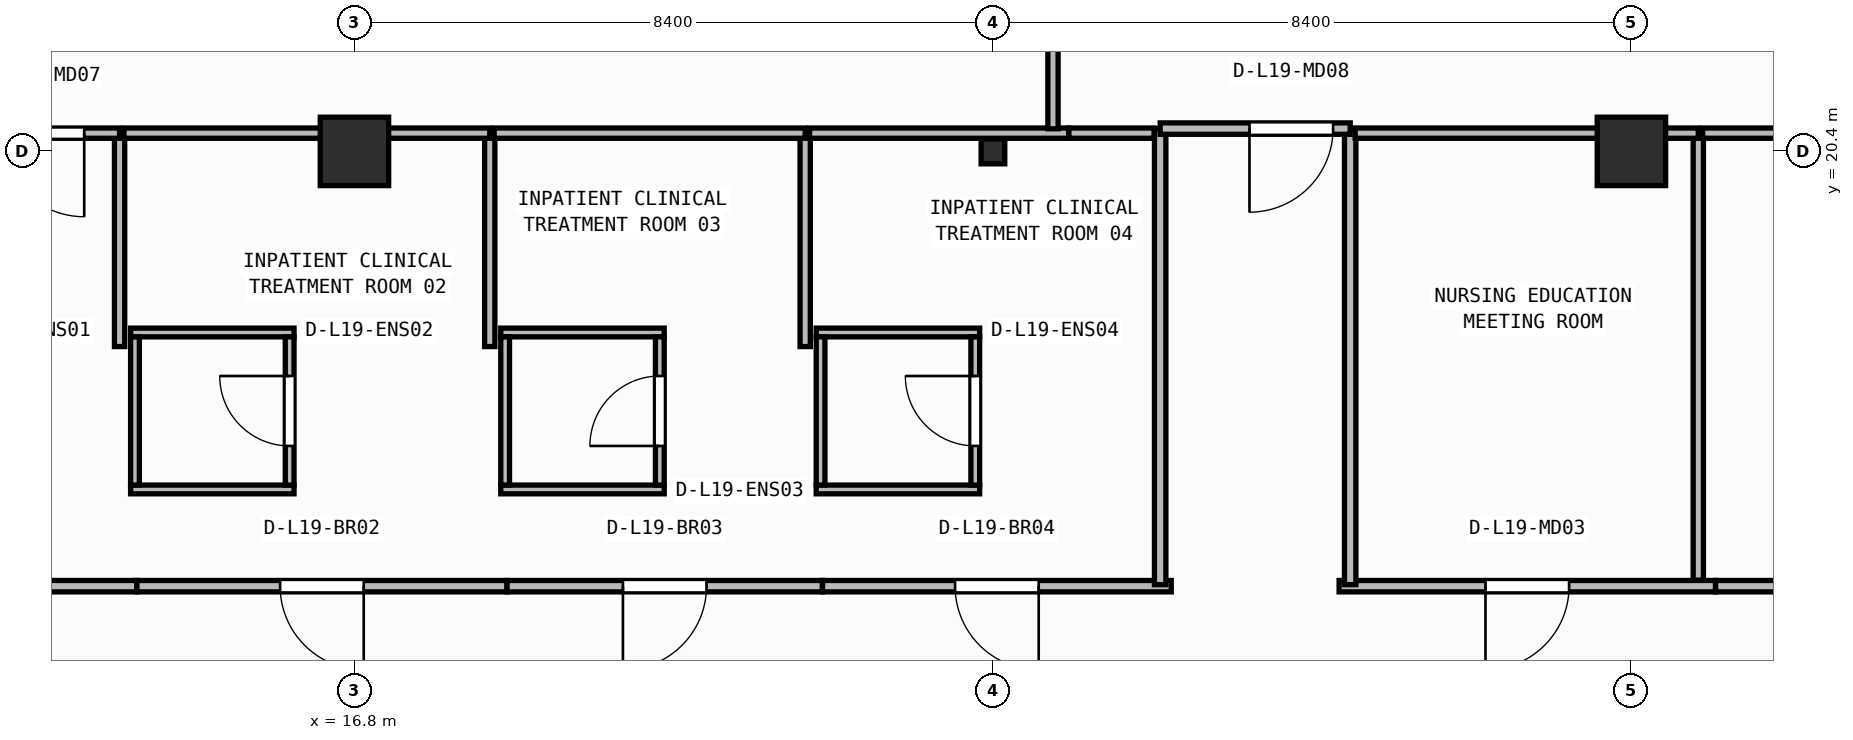
"""IFC4 building model, lengths in metres.
Left out: names, types, materials, properties, quantities, classifications, styles, units other than length and angle.
Written with IfcOpenShell. Run it as: python <this file> out.ifc"""

import sys

from ifc_helpers import new_model, si_unit, direction, frame, frame_2d, origin, origin_2d, place, context, subcontext, project, spatial, rectangle, i_section, extrude, element, fill, save


model = new_model("IFC4")
c1 = context("Model", 3, precision=1e-05, world=origin(), true_north=direction((0.0, 1.0)))
c2 = subcontext(c1, "Body", "Model", "MODEL_VIEW")
j1 = project(units=[si_unit("LENGTHUNIT", "METRE"), si_unit("PLANEANGLEUNIT", "RADIAN")], contexts=[c1])
p1 = place(None, origin())
s1 = spatial("IfcSite", under=j1, at=p1, CompositionType="ELEMENT")
p2 = place(p1, origin())
s2 = spatial("IfcBuilding", under=s1, at=p2, CompositionType="ELEMENT")
p3 = place(p2, frame((0.0, 0.0, 77.8)))
s3 = spatial("IfcBuildingStorey", under=s2, at=p3, CompositionType="ELEMENT", Elevation=77.8)
p4 = place(p3, frame((16.8, 20.4, 0.0), z_axis=(0.0, 0.0, 1.0), x_axis=(1.0, 0.0, 0.0)))
e1 = element("IfcColumn", 1, at=p4, inside=s3, PredefinedType="COLUMN", context=c2, shape_type="SweptSolid", body=[
    extrude(rectangle(XDim=0.9, YDim=0.9, at=origin_2d()), origin(), (0.0, 0.0, 1.0), 3.95),
])
p5 = place(p3, frame((25.2, 20.4, 0.0), z_axis=(0.0, 0.0, 1.0), x_axis=(1.0, 0.0, 0.0)))
e2 = element("IfcColumn", 2, at=p5, inside=s3, PredefinedType="COLUMN", context=c2, shape_type="SweptSolid", body=[
    extrude(i_section(OverallWidth=0.311, OverallDepth=0.327, WebThickness=0.016, FlangeThickness=0.025, FilletRadius=0.017, at=origin_2d()), origin(), (0.0, 0.0, 1.0), 3.95),
])
p6 = place(p3, frame((33.6, 20.4, 0.0), z_axis=(0.0, 0.0, 1.0), x_axis=(1.0, 0.0, 0.0)))
e3 = element("IfcColumn", 3, at=p6, inside=s3, PredefinedType="COLUMN", context=c2, shape_type="SweptSolid", body=[
    extrude(rectangle(XDim=0.9, YDim=0.9, at=origin_2d()), origin(), (0.0, 0.0, 1.0), 3.95),
])
for number, where, z_axis, x_axis in (
    (4, (13.855, 15.952, 0.0), (0.0, 0.0, 1.0), (1.0, 0.0, 0.0)),
    (5, (13.855, 18.018, 0.0), (0.0, 0.0, 1.0), (1.0, 0.0, 0.0)),
):
    element("IfcWall", number, at=place(p3, frame(where, z_axis=z_axis, x_axis=x_axis)), inside=s3, PredefinedType="PARTITIONING", context=c2, shape_type="SweptSolid", body=[
        extrude(rectangle(XDim=2.15, YDim=0.115, at=frame_2d((1.075, 0.0))), origin(), (0.0, 0.0, 1.0), 3.71),
    ])
p7 = place(p3, frame((13.913, 16.01, 0.0), z_axis=(0.0, 0.0, 1.0), x_axis=(0.0, 1.0, 0.0)))
e6 = element("IfcWall", 6, at=p7, inside=s3, PredefinedType="PARTITIONING", context=c2, shape_type="SweptSolid", body=[
    extrude(rectangle(XDim=1.95, YDim=0.115, at=frame_2d((0.975, 0.0))), origin(), (0.0, 0.0, 1.0), 3.71),
])
p8 = place(p3, frame((15.948, 16.01, 0.0), z_axis=(0.0, 0.0, 1.0), x_axis=(0.0, 1.0, 0.0)))
e7 = element("IfcWall", 7, at=p8, inside=s3, PredefinedType="PARTITIONING", context=c2, shape_type="SweptSolid", body=[
    extrude(rectangle(XDim=1.95, YDim=0.115, at=frame_2d((0.975, 0.0))), origin(), (0.0, 0.0, 1.0), 3.71),
])
p9 = place(p8, frame((0.515, 0.0, 0.0)))
e8 = element("IfcOpeningElement", 8, at=p9, cuts=e7, PredefinedType="OPENING", context=c2, shape_type="SweptSolid", body=[
    extrude(rectangle(XDim=0.92, YDim=2.1, at=frame_2d((0.46, 1.05))), frame((0.0, 0.067, 0.0), z_axis=(0.0, -1.0, 0.0), x_axis=(1.0, 0.0, 0.0)), (0.0, 0.0, 1.0), 0.135),
])
for number, where, z_axis, x_axis in (
    (9, (18.725, 15.952, 0.0), (0.0, 0.0, 1.0), (1.0, 0.0, 0.0)),
    (10, (18.725, 18.018, 0.0), (0.0, 0.0, 1.0), (1.0, 0.0, 0.0)),
):
    element("IfcWall", number, at=place(p3, frame(where, z_axis=z_axis, x_axis=x_axis)), inside=s3, PredefinedType="PARTITIONING", context=c2, shape_type="SweptSolid", body=[
        extrude(rectangle(XDim=2.15, YDim=0.115, at=frame_2d((1.075, 0.0))), origin(), (0.0, 0.0, 1.0), 3.71),
    ])
p10 = place(p3, frame((18.782, 16.01, 0.0), z_axis=(0.0, 0.0, 1.0), x_axis=(0.0, 1.0, 0.0)))
e11 = element("IfcWall", 11, at=p10, inside=s3, PredefinedType="PARTITIONING", context=c2, shape_type="SweptSolid", body=[
    extrude(rectangle(XDim=1.95, YDim=0.115, at=frame_2d((0.975, 0.0))), origin(), (0.0, 0.0, 1.0), 3.71),
])
p11 = place(p3, frame((20.817, 16.01, 0.0), z_axis=(0.0, 0.0, 1.0), x_axis=(0.0, 1.0, 0.0)))
e12 = element("IfcWall", 12, at=p11, inside=s3, PredefinedType="PARTITIONING", context=c2, shape_type="SweptSolid", body=[
    extrude(rectangle(XDim=1.95, YDim=0.115, at=frame_2d((0.975, 0.0))), origin(), (0.0, 0.0, 1.0), 3.71),
])
p12 = place(p11, frame((0.515, 0.0, 0.0)))
e13 = element("IfcOpeningElement", 13, at=p12, cuts=e12, PredefinedType="OPENING", context=c2, shape_type="SweptSolid", body=[
    extrude(rectangle(XDim=0.92, YDim=2.1, at=frame_2d((0.46, 1.05))), frame((0.0, 0.067, 0.0), z_axis=(0.0, -1.0, 0.0), x_axis=(1.0, 0.0, 0.0)), (0.0, 0.0, 1.0), 0.135),
])
for number, where, z_axis, x_axis in (
    (14, (22.875, 15.952, 0.0), (0.0, 0.0, 1.0), (1.0, 0.0, 0.0)),
    (15, (22.875, 18.018, 0.0), (0.0, 0.0, 1.0), (1.0, 0.0, 0.0)),
):
    element("IfcWall", number, at=place(p3, frame(where, z_axis=z_axis, x_axis=x_axis)), inside=s3, PredefinedType="PARTITIONING", context=c2, shape_type="SweptSolid", body=[
        extrude(rectangle(XDim=2.15, YDim=0.115, at=frame_2d((1.075, 0.0))), origin(), (0.0, 0.0, 1.0), 3.71),
    ])
p13 = place(p3, frame((22.933, 16.01, 0.0), z_axis=(0.0, 0.0, 1.0), x_axis=(0.0, 1.0, 0.0)))
e16 = element("IfcWall", 16, at=p13, inside=s3, PredefinedType="PARTITIONING", context=c2, shape_type="SweptSolid", body=[
    extrude(rectangle(XDim=1.95, YDim=0.115, at=frame_2d((0.975, 0.0))), origin(), (0.0, 0.0, 1.0), 3.71),
])
p14 = place(p3, frame((24.968, 16.01, 0.0), z_axis=(0.0, 0.0, 1.0), x_axis=(0.0, 1.0, 0.0)))
e17 = element("IfcWall", 17, at=p14, inside=s3, PredefinedType="PARTITIONING", context=c2, shape_type="SweptSolid", body=[
    extrude(rectangle(XDim=1.95, YDim=0.115, at=frame_2d((0.975, 0.0))), origin(), (0.0, 0.0, 1.0), 3.073),
])
p15 = place(p14, frame((0.515, 0.0, 0.0)))
e18 = element("IfcOpeningElement", 18, at=p15, cuts=e17, PredefinedType="OPENING", context=c2, shape_type="SweptSolid", body=[
    extrude(rectangle(XDim=0.92, YDim=2.1, at=frame_2d((0.46, 1.05))), frame((0.0, 0.067, 0.0), z_axis=(0.0, -1.0, 0.0), x_axis=(1.0, 0.0, 0.0)), (0.0, 0.0, 1.0), 0.135),
])
p16 = place(p3, frame((13.936, 14.68, 0.0), z_axis=(0.0, 0.0, 1.0), x_axis=(-1.0, 0.0, 0.0)))
e19 = element("IfcWall", 19, at=p16, inside=s3, PredefinedType="PARTITIONING", context=c2, shape_type="SweptSolid", body=[
    extrude(rectangle(XDim=4.508, YDim=0.15, at=frame_2d((2.254, 0.0))), origin(), (0.0, 0.0, 1.0), 3.71),
])
p17 = place(p16, frame((1.704, 0.0, 0.0)))
e20 = element("IfcOpeningElement", 20, at=p17, cuts=e19, PredefinedType="OPENING", context=c2, shape_type="SweptSolid", body=[
    extrude(rectangle(XDim=1.1, YDim=2.1, at=frame_2d((0.55, 1.05))), frame((0.0, 0.085, 0.0), z_axis=(0.0, -1.0, 0.0), x_axis=(1.0, 0.0, 0.0)), (0.0, 0.0, 1.0), 0.17),
])
p18 = place(p3, frame((18.806, 14.68, 0.0), z_axis=(0.0, 0.0, 1.0), x_axis=(-1.0, 0.0, 0.0)))
e21 = element("IfcWall", 21, at=p18, inside=s3, PredefinedType="PARTITIONING", context=c2, shape_type="SweptSolid", body=[
    extrude(rectangle(XDim=4.868, YDim=0.15, at=frame_2d((2.434, 0.0))), origin(), (0.0, 0.0, 1.0), 3.71),
])
p19 = place(p18, frame((1.884, 0.0, 0.0)))
e22 = element("IfcOpeningElement", 22, at=p19, cuts=e21, PredefinedType="OPENING", context=c2, shape_type="SweptSolid", body=[
    extrude(rectangle(XDim=1.1, YDim=2.1, at=frame_2d((0.55, 1.05))), frame((0.0, 0.085, 0.0), z_axis=(0.0, -1.0, 0.0), x_axis=(1.0, 0.0, 0.0)), (0.0, 0.0, 1.0), 0.17),
])
p20 = place(p3, frame((22.956, 14.68, 0.0), z_axis=(0.0, 0.0, 1.0), x_axis=(-1.0, 0.0, 0.0)))
e23 = element("IfcWall", 23, at=p20, inside=s3, PredefinedType="PARTITIONING", context=c2, shape_type="SweptSolid", body=[
    extrude(rectangle(XDim=4.148, YDim=0.15, at=frame_2d((2.074, 0.0))), origin(), (0.0, 0.0, 1.0), 3.71),
])
p21 = place(p20, frame((1.524, 0.0, 0.0)))
e24 = element("IfcOpeningElement", 24, at=p21, cuts=e23, PredefinedType="OPENING", context=c2, shape_type="SweptSolid", body=[
    extrude(rectangle(XDim=1.1, YDim=2.1, at=frame_2d((0.55, 1.05))), frame((0.0, 0.085, 0.0), z_axis=(0.0, -1.0, 0.0), x_axis=(1.0, 0.0, 0.0)), (0.0, 0.0, 1.0), 0.17),
])
p22 = place(p3, frame((27.546, 14.68, 0.0), z_axis=(0.0, 0.0, 1.0), x_axis=(-1.0, 0.0, 0.0)))
e25 = element("IfcWall", 25, at=p22, inside=s3, PredefinedType="PARTITIONING", context=c2, shape_type="SweptSolid", body=[
    extrude(rectangle(XDim=4.588, YDim=0.15, at=frame_2d((2.294, 0.0))), origin(), (0.0, 0.0, 1.0), 3.71),
])
p23 = place(p22, frame((1.744, 0.0, 0.0)))
e26 = element("IfcOpeningElement", 26, at=p23, cuts=e25, PredefinedType="OPENING", context=c2, shape_type="SweptSolid", body=[
    extrude(rectangle(XDim=1.1, YDim=2.1, at=frame_2d((0.55, 1.05))), frame((0.0, 0.085, 0.0), z_axis=(0.0, -1.0, 0.0), x_axis=(1.0, 0.0, 0.0)), (0.0, 0.0, 1.0), 0.17),
])
p24 = place(p3, frame((34.706, 14.68, 0.0), z_axis=(0.0, 0.0, 1.0), x_axis=(-1.0, 0.0, 0.0)))
e27 = element("IfcWall", 27, at=p24, inside=s3, PredefinedType="PARTITIONING", context=c2, shape_type="SweptSolid", body=[
    extrude(rectangle(XDim=4.952, YDim=0.15, at=frame_2d((2.476, 0.0))), origin(), (0.0, 0.0, 1.0), 3.71),
])
p25 = place(p24, frame((1.926, 0.0, 0.0)))
e28 = element("IfcOpeningElement", 28, at=p25, cuts=e27, PredefinedType="OPENING", context=c2, shape_type="SweptSolid", body=[
    extrude(rectangle(XDim=1.1, YDim=2.1, at=frame_2d((0.55, 1.05))), frame((0.0, 0.085, 0.0), z_axis=(0.0, -1.0, 0.0), x_axis=(1.0, 0.0, 0.0)), (0.0, 0.0, 1.0), 0.17),
])
p26 = place(p3, frame((40.606, 14.68, 0.0), z_axis=(0.0, 0.0, 1.0), x_axis=(-1.0, 0.0, 0.0)))
e29 = element("IfcWall", 29, at=p26, inside=s3, PredefinedType="PARTITIONING", context=c2, shape_type="SweptSolid", body=[
    extrude(rectangle(XDim=5.898, YDim=0.15, at=frame_2d((2.949, 0.0))), origin(), (0.0, 0.0, 1.0), 3.71),
])
p27 = place(p26, frame((2.399, 0.0, 0.0)))
e30 = element("IfcOpeningElement", 30, at=p27, cuts=e29, PredefinedType="OPENING", context=c2, shape_type="SweptSolid", body=[
    extrude(rectangle(XDim=1.1, YDim=2.1, at=frame_2d((0.55, 1.05))), frame((0.0, 0.085, 0.0), z_axis=(0.0, -1.0, 0.0), x_axis=(1.0, 0.0, 0.0)), (0.0, 0.0, 1.0), 0.17),
])
for number, where, z_axis, x_axis in (
    (31, (27.4, 20.7, 0.0), (0.0, 0.0, 1.0), (0.0, -1.0, 0.0)),
    (32, (29.9, 14.7, 0.0), (0.0, 0.0, 1.0), (0.0, 1.0, 0.0)),
):
    element("IfcWall", number, at=place(p3, frame(where, z_axis=z_axis, x_axis=x_axis)), inside=s3, PredefinedType="PARTITIONING", context=c2, shape_type="SweptSolid", body=[
        extrude(rectangle(XDim=6.0, YDim=0.15, at=frame_2d((3.0, 0.0))), origin(), (0.0, 0.0, 1.0), 3.71),
    ])
p28 = place(p3, frame((29.9, 20.7, 0.0), z_axis=(0.0, 0.0, 1.0), x_axis=(-1.0, 0.0, 0.0)))
e33 = element("IfcWall", 33, at=p28, inside=s3, PredefinedType="PARTITIONING", context=c2, shape_type="SweptSolid", body=[
    extrude(rectangle(XDim=2.5, YDim=0.15, at=frame_2d((1.25, 0.0))), origin(), (0.0, 0.0, 1.0), 3.073),
])
p29 = place(p28, frame((0.225, 0.0, 0.0)))
e34 = element("IfcOpeningElement", 34, at=p29, cuts=e33, PredefinedType="OPENING", context=c2, shape_type="SweptSolid", body=[
    extrude(rectangle(XDim=1.1, YDim=2.1, at=frame_2d((0.55, 1.05))), frame((0.0, 0.085, 0.0), z_axis=(0.0, -1.0, 0.0), x_axis=(1.0, 0.0, 0.0)), (0.0, 0.0, 1.0), 0.17),
])
p30 = place(p3, frame((13.71, 17.833, 0.0), z_axis=(0.0, 0.0, 1.0), x_axis=(0.0, 1.0, 0.0)))
e35 = element("IfcWall", 35, at=p30, inside=s3, PredefinedType="PARTITIONING", context=c2, shape_type="SweptSolid", body=[
    extrude(rectangle(XDim=2.807, YDim=0.135, at=frame_2d((1.404, 0.0))), origin(), (0.0, 0.0, 1.0), 3.71),
])
p31 = place(p3, frame((13.71, 20.64, 0.0), z_axis=(0.0, 0.0, 1.0), x_axis=(-1.0, 0.0, 0.0)))
e36 = element("IfcWall", 36, at=p31, inside=s3, PredefinedType="PARTITIONING", context=c2, shape_type="SweptSolid", body=[
    extrude(rectangle(XDim=2.031, YDim=0.135, at=frame_2d((1.015, 0.0))), origin(), (0.0, 0.0, 1.0), 3.073),
])
p32 = place(p31, frame((0.465, 0.0, 0.0)))
e37 = element("IfcOpeningElement", 37, at=p32, cuts=e36, PredefinedType="OPENING", context=c2, shape_type="SweptSolid", body=[
    extrude(rectangle(XDim=1.1, YDim=2.1, at=frame_2d((0.55, 1.05))), frame((0.0, 0.077, 0.0), z_axis=(0.0, -1.0, 0.0), x_axis=(1.0, 0.0, 0.0)), (0.0, 0.0, 1.0), 0.155),
])
p33 = place(p3, frame((18.58, 17.833, 0.0), z_axis=(0.0, 0.0, 1.0), x_axis=(0.0, 1.0, 0.0)))
e38 = element("IfcWall", 38, at=p33, inside=s3, PredefinedType="PARTITIONING", context=c2, shape_type="SweptSolid", body=[
    extrude(rectangle(XDim=2.807, YDim=0.135, at=frame_2d((1.404, 0.0))), origin(), (0.0, 0.0, 1.0), 3.71),
])
p34 = place(p3, frame((18.58, 20.64, 0.0), z_axis=(0.0, 0.0, 1.0), x_axis=(-1.0, 0.0, 0.0)))
e39 = element("IfcWall", 39, at=p34, inside=s3, PredefinedType="PARTITIONING", context=c2, shape_type="SweptSolid", body=[
    extrude(rectangle(XDim=4.812, YDim=0.135, at=frame_2d((2.406, 0.0))), origin(), (0.0, 0.0, 1.0), 3.073),
])
p35 = place(p3, frame((22.73, 17.833, 0.0), z_axis=(0.0, 0.0, 1.0), x_axis=(0.0, 1.0, 0.0)))
e40 = element("IfcWall", 40, at=p35, inside=s3, PredefinedType="PARTITIONING", context=c2, shape_type="SweptSolid", body=[
    extrude(rectangle(XDim=2.807, YDim=0.135, at=frame_2d((1.404, 0.0))), origin(), (0.0, 0.0, 1.0), 3.71),
])
p36 = place(p3, frame((22.73, 20.64, 0.0), z_axis=(0.0, 0.0, 1.0), x_axis=(-1.0, 0.0, 0.0)))
e41 = element("IfcWall", 41, at=p36, inside=s3, PredefinedType="PARTITIONING", context=c2, shape_type="SweptSolid", body=[
    extrude(rectangle(XDim=4.093, YDim=0.135, at=frame_2d((2.046, 0.0))), origin(), (0.0, 0.0, 1.0), 3.073),
])
p37 = place(p3, frame((26.198, 20.64, 0.0), z_axis=(0.0, 0.0, 1.0), x_axis=(-1.0, 0.0, 0.0)))
e42 = element("IfcWall", 42, at=p37, inside=s3, PredefinedType="PARTITIONING", context=c2, shape_type="SweptSolid", body=[
    extrude(rectangle(XDim=3.41, YDim=0.135, at=frame_2d((1.705, 0.0))), origin(), (0.0, 0.0, 1.0), 3.073),
])
p38 = place(p3, frame((27.32, 20.64, 0.0), z_axis=(0.0, 0.0, 1.0), x_axis=(-1.0, 0.0, 0.0)))
e43 = element("IfcWall", 43, at=p38, inside=s3, PredefinedType="PARTITIONING", context=c2, shape_type="SweptSolid", body=[
    extrude(rectangle(XDim=1.121, YDim=0.135, at=frame_2d((0.56, 0.0))), origin(), (0.0, 0.0, 1.0), 3.073),
])
p39 = place(p3, frame((34.48, 14.76, 0.0), z_axis=(0.0, 0.0, 1.0), x_axis=(0.0, 1.0, 0.0)))
e44 = element("IfcWall", 44, at=p39, inside=s3, PredefinedType="PARTITIONING", context=c2, shape_type="SweptSolid", body=[
    extrude(rectangle(XDim=5.88, YDim=0.135, at=frame_2d((2.94, 0.0))), origin(), (0.0, 0.0, 1.0), 3.71),
])
p40 = place(p3, frame((34.48, 20.64, 0.0), z_axis=(0.0, 0.0, 1.0), x_axis=(-1.0, 0.0, 0.0)))
e45 = element("IfcWall", 45, at=p40, inside=s3, PredefinedType="PARTITIONING", context=c2, shape_type="SweptSolid", body=[
    extrude(rectangle(XDim=4.515, YDim=0.135, at=frame_2d((2.257, 0.0))), origin(), (0.0, 0.0, 1.0), 3.073),
])
p41 = place(p3, frame((40.38, 20.64, 0.0), z_axis=(0.0, 0.0, 1.0), x_axis=(-1.0, 0.0, 0.0)))
e46 = element("IfcWall", 46, at=p41, inside=s3, PredefinedType="PARTITIONING", context=c2, shape_type="SweptSolid", body=[
    extrude(rectangle(XDim=5.842, YDim=0.135, at=frame_2d((2.921, 0.0))), origin(), (0.0, 0.0, 1.0), 3.073),
])
p42 = place(p3, frame((25.99, 20.698, 0.0), z_axis=(0.0, 0.0, 1.0), x_axis=(0.0, 1.0, 0.0)))
e47 = element("IfcWall", 47, at=p42, inside=s3, PredefinedType="PARTITIONING", context=c2, shape_type="SweptSolid", body=[
    extrude(rectangle(XDim=10.779, YDim=0.135, at=frame_2d((5.39, 0.0))), origin(), (0.0, 0.0, 1.0), 3.71),
])
p43 = place(p9, origin())
e48 = element("IfcDoor", 48, at=p43, inside=s3, OperationType="SINGLE_SWING_RIGHT", PredefinedType="DOOR", context=c2, shape_type="SweptSolid", body=[
    extrude(rectangle(XDim=0.92, YDim=2.1, at=frame_2d((0.46, 1.05))), frame((0.0, 0.025, 0.0), z_axis=(0.0, -1.0, 0.0), x_axis=(1.0, 0.0, 0.0)), (0.0, 0.0, 1.0), 0.05),
])
fill(e8, e48)
p44 = place(p12, origin())
e49 = element("IfcDoor", 49, at=p44, inside=s3, OperationType="SINGLE_SWING_LEFT", PredefinedType="DOOR", context=c2, shape_type="SweptSolid", body=[
    extrude(rectangle(XDim=0.92, YDim=2.1, at=frame_2d((0.46, 1.05))), frame((0.0, 0.025, 0.0), z_axis=(0.0, -1.0, 0.0), x_axis=(1.0, 0.0, 0.0)), (0.0, 0.0, 1.0), 0.05),
])
fill(e13, e49)
p45 = place(p15, origin())
e50 = element("IfcDoor", 50, at=p45, inside=s3, OperationType="SINGLE_SWING_RIGHT", PredefinedType="DOOR", context=c2, shape_type="SweptSolid", body=[
    extrude(rectangle(XDim=0.92, YDim=2.1, at=frame_2d((0.46, 1.05))), frame((0.0, 0.025, 0.0), z_axis=(0.0, -1.0, 0.0), x_axis=(1.0, 0.0, 0.0)), (0.0, 0.0, 1.0), 0.05),
])
fill(e18, e50)
p46 = place(p19, origin())
e51 = element("IfcDoor", 51, at=p46, inside=s3, OperationType="SINGLE_SWING_LEFT", PredefinedType="DOOR", context=c2, shape_type="SweptSolid", body=[
    extrude(rectangle(XDim=1.1, YDim=2.1, at=frame_2d((0.55, 1.05))), frame((0.0, 0.025, 0.0), z_axis=(0.0, -1.0, 0.0), x_axis=(1.0, 0.0, 0.0)), (0.0, 0.0, 1.0), 0.05),
])
fill(e22, e51)
p47 = place(p21, origin())
e52 = element("IfcDoor", 52, at=p47, inside=s3, OperationType="SINGLE_SWING_RIGHT", PredefinedType="DOOR", context=c2, shape_type="SweptSolid", body=[
    extrude(rectangle(XDim=1.1, YDim=2.1, at=frame_2d((0.55, 1.05))), frame((0.0, 0.025, 0.0), z_axis=(0.0, -1.0, 0.0), x_axis=(1.0, 0.0, 0.0)), (0.0, 0.0, 1.0), 0.05),
])
fill(e24, e52)
p48 = place(p23, origin())
e53 = element("IfcDoor", 53, at=p48, inside=s3, OperationType="SINGLE_SWING_LEFT", PredefinedType="DOOR", context=c2, shape_type="SweptSolid", body=[
    extrude(rectangle(XDim=1.1, YDim=2.1, at=frame_2d((0.55, 1.05))), frame((0.0, 0.025, 0.0), z_axis=(0.0, -1.0, 0.0), x_axis=(1.0, 0.0, 0.0)), (0.0, 0.0, 1.0), 0.05),
])
fill(e26, e53)
p49 = place(p25, origin())
e54 = element("IfcDoor", 54, at=p49, inside=s3, OperationType="SINGLE_SWING_RIGHT", PredefinedType="DOOR", context=c2, shape_type="SweptSolid", body=[
    extrude(rectangle(XDim=1.1, YDim=2.1, at=frame_2d((0.55, 1.05))), frame((0.0, 0.025, 0.0), z_axis=(0.0, -1.0, 0.0), x_axis=(1.0, 0.0, 0.0)), (0.0, 0.0, 1.0), 0.05),
])
fill(e28, e54)
p50 = place(p29, origin())
e55 = element("IfcDoor", 55, at=p50, inside=s3, OperationType="SINGLE_SWING_RIGHT", PredefinedType="DOOR", context=c2, shape_type="SweptSolid", body=[
    extrude(rectangle(XDim=1.1, YDim=2.1, at=frame_2d((0.55, 1.05))), frame((0.0, 0.025, 0.0), z_axis=(0.0, -1.0, 0.0), x_axis=(1.0, 0.0, 0.0)), (0.0, 0.0, 1.0), 0.05),
])
fill(e34, e55)
p51 = place(p32, origin())
e56 = element("IfcDoor", 56, at=p51, inside=s3, OperationType="SINGLE_SWING_LEFT", PredefinedType="DOOR", context=c2, shape_type="SweptSolid", body=[
    extrude(rectangle(XDim=1.1, YDim=2.1, at=frame_2d((0.55, 1.05))), frame((0.0, 0.025, 0.0), z_axis=(0.0, -1.0, 0.0), x_axis=(1.0, 0.0, 0.0)), (0.0, 0.0, 1.0), 0.05),
])
fill(e37, e56)
save(model, sys.argv[1])
